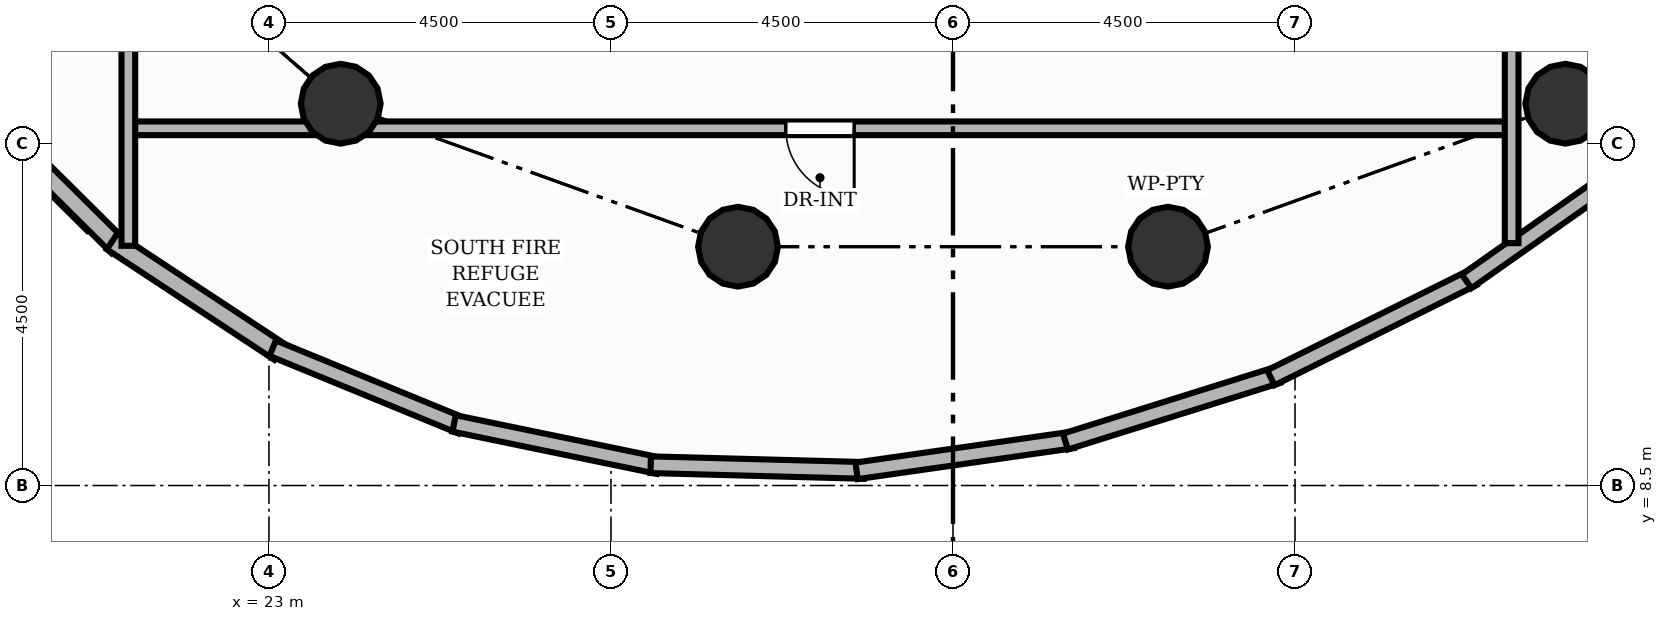
"""IFC4 building model, lengths in metres.
Left out: names, types, materials, properties, quantities, classifications, styles, units other than length and angle.
Written with IfcOpenShell. Run it as: python <this file> out.ifc"""

import sys

from ifc_helpers import new_model, si_unit, direction, frame, frame_2d, origin, origin_2d, place, context, subcontext, project, spatial, rectangle, circle, extrude, element, fill, save


model = new_model("IFC4")
c1 = context("Model", 3, precision=1e-05, world=origin(), true_north=direction((0.0, 1.0)))
c2 = subcontext(c1, "Body", "Model", "MODEL_VIEW")
j1 = project(units=[si_unit("LENGTHUNIT", "METRE"), si_unit("PLANEANGLEUNIT", "RADIAN")], contexts=[c1])
p1 = place(None, origin())
s1 = spatial("IfcSite", under=j1, at=p1, CompositionType="ELEMENT")
p2 = place(p1, origin())
s2 = spatial("IfcBuilding", under=s1, at=p2, CompositionType="ELEMENT")
p3 = place(p2, frame((0.0, 0.0, 158.56)))
s3 = spatial("IfcBuildingStorey", under=s2, at=p3, CompositionType="ELEMENT", Elevation=158.56)
for number, where, z_axis, x_axis in (
    (1, (23.944, 13.523, 0.0), (0.0, 0.0, 1.0), (1.0, 0.0, 0.0)),
    (2, (29.171, 11.642, 0.0), (0.0, 0.0, 1.0), (1.0, 0.0, 0.0)),
    (3, (34.829, 11.642, 0.0), (0.0, 0.0, 1.0), (1.0, 0.0, 0.0)),
    (4, (40.056, 13.523, 0.0), (0.0, 0.0, 1.0), (1.0, 0.0, 0.0)),
):
    element("IfcColumn", number, at=place(p3, frame(where, z_axis=z_axis, x_axis=x_axis)), inside=s3, PredefinedType="COLUMN", context=c2, shape_type="SweptSolid", body=[
        extrude(circle(Radius=0.525, at=origin_2d()), origin(), (0.0, 0.0, 1.0), 4.48),
    ])
p4 = place(p3, frame((21.015, 11.647, 0.0), z_axis=(0.0, 0.0, 1.0), x_axis=(-0.709903110451, 0.704299349547, 0.0)))
e5 = element("IfcWall", 5, at=p4, inside=s3, PredefinedType="SOLIDWALL", context=c2, shape_type="SweptSolid", body=[
    extrude(rectangle(XDim=2.614, YDim=0.25, at=frame_2d((1.307, 0.0))), origin(), (0.0, 0.0, 1.0), 4.24),
])
p5 = place(p3, frame((23.139, 10.259, 0.0), z_axis=(0.0, 0.0, 1.0), x_axis=(-0.834886685629, 0.55042185836, 0.0)))
e6 = element("IfcWall", 6, at=p5, inside=s3, PredefinedType="SOLIDWALL", context=c2, shape_type="SweptSolid", body=[
    extrude(rectangle(XDim=2.638, YDim=0.25, at=frame_2d((1.319, 0.0))), origin(), (0.0, 0.0, 1.0), 4.24),
])
p6 = place(p3, frame((25.532, 9.288, 0.0), z_axis=(0.0, 0.0, 1.0), x_axis=(-0.925126004984, 0.379660209797, 0.0)))
e7 = element("IfcWall", 7, at=p6, inside=s3, PredefinedType="PARAPET", context=c2, shape_type="SweptSolid", body=[
    extrude(rectangle(XDim=2.683, YDim=0.22, at=frame_2d((1.341, 0.0))), origin(), (0.0, 0.0, 1.0), 1.15),
])
p7 = place(p3, frame((28.121, 8.762, 0.0), z_axis=(0.0, 0.0, 1.0), x_axis=(-0.979324939828, 0.202293505163, 0.0)))
e8 = element("IfcWall", 8, at=p7, inside=s3, PredefinedType="PARAPET", context=c2, shape_type="SweptSolid", body=[
    extrude(rectangle(XDim=2.742, YDim=0.22, at=frame_2d((1.371, 0.0))), origin(), (0.0, 0.0, 1.0), 1.15),
])
p8 = place(p3, frame((30.83, 8.698, 0.0), z_axis=(0.0, 0.0, 1.0), x_axis=(-0.999645930397, 0.026608529463, 0.0)))
e9 = element("IfcWall", 9, at=p8, inside=s3, PredefinedType="PARAPET", context=c2, shape_type="SweptSolid", body=[
    extrude(rectangle(XDim=2.808, YDim=0.22, at=frame_2d((1.404, 0.0))), origin(), (0.0, 0.0, 1.0), 1.15),
])
p9 = place(p3, frame((33.574, 9.1, 0.0), z_axis=(0.0, 0.0, 1.0), x_axis=(-0.989906941775, -0.141718900029, 0.0)))
e10 = element("IfcWall", 10, at=p9, inside=s3, PredefinedType="PARAPET", context=c2, shape_type="SweptSolid", body=[
    extrude(rectangle(XDim=2.872, YDim=0.22, at=frame_2d((1.436, 0.0))), origin(), (0.0, 0.0, 1.0), 1.15),
])
p10 = place(p3, frame((36.272, 9.954, 0.0), z_axis=(0.0, 0.0, 1.0), x_axis=(-0.95419458776, -0.299186712089, 0.0)))
e11 = element("IfcWall", 11, at=p10, inside=s3, PredefinedType="PARAPET", context=c2, shape_type="SweptSolid", body=[
    extrude(rectangle(XDim=2.927, YDim=0.22, at=frame_2d((1.463, 0.0))), origin(), (0.0, 0.0, 1.0), 1.15),
])
p11 = place(p3, frame((38.84, 11.236, 0.0), z_axis=(0.0, 0.0, 1.0), x_axis=(-0.895985112276, -0.444084089536, 0.0)))
e12 = element("IfcWall", 12, at=p11, inside=s3, PredefinedType="PARAPET", context=c2, shape_type="SweptSolid", body=[
    extrude(rectangle(XDim=2.967, YDim=0.22, at=frame_2d((1.483, 0.0))), origin(), (0.0, 0.0, 1.0), 1.15),
])
p12 = place(p3, frame((41.201, 12.906, 0.0), z_axis=(0.0, 0.0, 1.0), x_axis=(-0.817874769697, -0.575396264407, 0.0)))
e13 = element("IfcWall", 13, at=p12, inside=s3, PredefinedType="PARAPET", context=c2, shape_type="SweptSolid", body=[
    extrude(rectangle(XDim=2.988, YDim=0.22, at=frame_2d((1.494, 0.0))), origin(), (0.0, 0.0, 1.0), 1.15),
])
p13 = place(p3, frame((39.35, 13.2, 0.0), z_axis=(0.0, 0.0, 1.0), x_axis=(-1.0, 0.0, 0.0)))
e14 = element("IfcWall", 14, at=p13, inside=s3, PredefinedType="PARTITIONING", context=c2, shape_type="SweptSolid", body=[
    extrude(rectangle(XDim=18.2, YDim=0.18, at=frame_2d((9.1, 0.0))), origin(), (0.0, 0.0, 1.0), 3.768),
])
p14 = place(p13, frame((8.65, 0.0, 0.0)))
e15 = element("IfcOpeningElement", 15, at=p14, cuts=e14, PredefinedType="OPENING", context=c2, shape_type="SweptSolid", body=[
    extrude(rectangle(XDim=0.9, YDim=2.1, at=frame_2d((0.45, 1.05))), frame((0.0, 0.1, 0.0), z_axis=(0.0, -1.0, 0.0), x_axis=(1.0, 0.0, 0.0)), (0.0, 0.0, 1.0), 0.2),
])
p15 = place(p3, frame((21.15, 11.654, 0.0), z_axis=(0.0, 0.0, 1.0), x_axis=(0.0, 1.0, 0.0)))
e16 = element("IfcWall", 16, at=p15, inside=s3, PredefinedType="PARTITIONING", context=c2, shape_type="SweptSolid", body=[
    extrude(rectangle(XDim=11.196, YDim=0.18, at=frame_2d((5.598, 0.0))), origin(), (0.0, 0.0, 1.0), 4.235),
])
p16 = place(p15, frame((6.371, 0.0, 0.0)))
e17 = element("IfcOpeningElement", 17, at=p16, cuts=e16, PredefinedType="OPENING", context=c2, shape_type="SweptSolid", body=[
    extrude(rectangle(XDim=0.9, YDim=2.1, at=frame_2d((0.45, 1.05))), frame((0.0, 0.1, 0.0), z_axis=(0.0, -1.0, 0.0), x_axis=(1.0, 0.0, 0.0)), (0.0, 0.0, 1.0), 0.2),
])
p17 = place(p3, frame((39.35, 22.79, 0.0), z_axis=(0.0, 0.0, 1.0), x_axis=(0.0, -1.0, 0.0)))
e18 = element("IfcWall", 18, at=p17, inside=s3, PredefinedType="PARTITIONING", context=c2, shape_type="SweptSolid", body=[
    extrude(rectangle(XDim=11.101, YDim=0.18, at=frame_2d((5.551, 0.0))), origin(), (0.0, 0.0, 1.0), 4.235),
])
p18 = place(p17, frame((3.965, 0.0, 0.0)))
e19 = element("IfcOpeningElement", 19, at=p18, cuts=e18, PredefinedType="OPENING", context=c2, shape_type="SweptSolid", body=[
    extrude(rectangle(XDim=0.9, YDim=2.1, at=frame_2d((0.45, 1.05))), frame((0.0, 0.1, 0.0), z_axis=(0.0, -1.0, 0.0), x_axis=(1.0, 0.0, 0.0)), (0.0, 0.0, 1.0), 0.2),
])
p19 = place(p14, origin())
e20 = element("IfcDoor", 20, at=p19, inside=s3, OperationType="SINGLE_SWING_LEFT", PredefinedType="DOOR", context=c2, shape_type="SweptSolid", body=[
    extrude(rectangle(XDim=0.9, YDim=2.1, at=frame_2d((0.45, 1.05))), frame((0.0, 0.025, 0.0), z_axis=(0.0, -1.0, 0.0), x_axis=(1.0, 0.0, 0.0)), (0.0, 0.0, 1.0), 0.05),
])
fill(e15, e20)
save(model, sys.argv[1])
